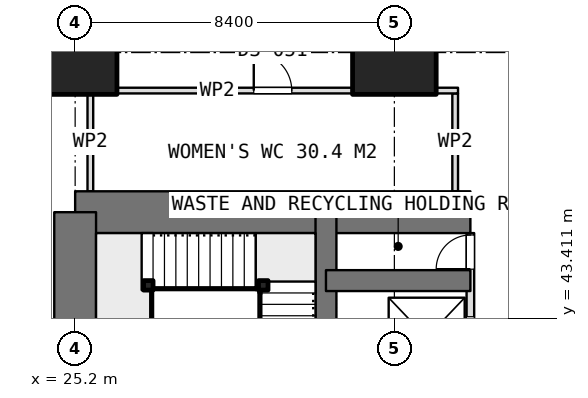
"""IFC4 building model, lengths in metres.
Left out: names, types, materials, properties, quantities, classifications, styles, units other than length and angle.
Written with IfcOpenShell. Run it as: python <this file> out.ifc"""

import sys

from ifc_helpers import new_model, si_unit, direction, frame, frame_2d, origin, origin_2d, place, context, subcontext, project, spatial, rectangle, extrude, element, fill, save


model = new_model("IFC4")
c1 = context("Model", 3, precision=1e-05, world=origin(), true_north=direction((0.0, 1.0)))
c2 = subcontext(c1, "Body", "Model", "MODEL_VIEW")
j1 = project(units=[si_unit("LENGTHUNIT", "METRE"), si_unit("PLANEANGLEUNIT", "RADIAN")], contexts=[c1])
p1 = place(None, origin())
s1 = spatial("IfcSite", under=j1, at=p1, CompositionType="ELEMENT")
p2 = place(p1, origin())
s2 = spatial("IfcBuilding", under=s1, at=p2, CompositionType="ELEMENT")
p3 = place(p2, frame((0.0, 0.0, 44.15)))
s3 = spatial("IfcBuildingStorey", under=s2, at=p3, CompositionType="ELEMENT", Elevation=44.15)
p4 = place(p3, frame((25.2, 46.2, 0.0), z_axis=(0.0, 0.0, 1.0), x_axis=(1.0, 0.0, 0.0)))
e1 = element("IfcWall", 1, at=p4, inside=s3, PredefinedType="SHEAR", context=c2, shape_type="SweptSolid", body=[
    extrude(rectangle(XDim=10.4, YDim=1.1, at=frame_2d((5.2, 0.0))), origin(), (0.0, 0.0, 1.0), 3.75),
])
p5 = place(p3, frame((25.2, 21.0, 0.0), z_axis=(0.0, 0.0, 1.0), x_axis=(0.0, 1.0, 0.0)))
e2 = element("IfcWall", 2, at=p5, inside=s3, PredefinedType="SHEAR", context=c2, shape_type="SweptSolid", body=[
    extrude(rectangle(XDim=25.2, YDim=1.1, at=frame_2d((12.6, 0.0))), origin(), (0.0, 0.0, 1.0), 3.75),
])
p6 = place(p5, frame((7.8, 0.0, 0.0)))
e3 = element("IfcOpeningElement", 3, at=p6, cuts=e2, PredefinedType="OPENING", context=c2, shape_type="SweptSolid", body=[
    extrude(rectangle(XDim=1.2, YDim=2.1, at=frame_2d((0.6, 1.05))), frame((0.0, 0.56, 0.0), z_axis=(0.0, -1.0, 0.0), x_axis=(1.0, 0.0, 0.0)), (0.0, 0.0, 1.0), 1.12),
])
p7 = place(p5, frame((14.25, 0.0, 0.0)))
e4 = element("IfcOpeningElement", 4, at=p7, cuts=e2, PredefinedType="OPENING", context=c2, shape_type="SweptSolid", body=[
    extrude(rectangle(XDim=0.9, YDim=2.1, at=frame_2d((0.45, 1.05))), frame((0.0, 0.56, 0.0), z_axis=(0.0, -1.0, 0.0), x_axis=(1.0, 0.0, 0.0)), (0.0, 0.0, 1.0), 1.12),
])
p8 = place(p5, frame((16.85, 0.0, 0.0)))
e5 = element("IfcOpeningElement", 5, at=p8, cuts=e2, PredefinedType="OPENING", context=c2, shape_type="SweptSolid", body=[
    extrude(rectangle(XDim=0.9, YDim=2.1, at=frame_2d((0.45, 1.05))), frame((0.0, 0.56, 0.0), z_axis=(0.0, -1.0, 0.0), x_axis=(1.0, 0.0, 0.0)), (0.0, 0.0, 1.0), 1.12),
])
p9 = place(p5, frame((19.075, 0.0, 0.0)))
e6 = element("IfcOpeningElement", 6, at=p9, cuts=e2, PredefinedType="OPENING", context=c2, shape_type="SweptSolid", body=[
    extrude(rectangle(XDim=1.2, YDim=2.1, at=frame_2d((0.6, 1.05))), frame((0.0, 0.56, 0.0), z_axis=(0.0, -1.0, 0.0), x_axis=(1.0, 0.0, 0.0)), (0.0, 0.0, 1.0), 1.12),
])
p10 = place(p3, frame((31.8, 21.0, 0.0), z_axis=(0.0, 0.0, 1.0), x_axis=(0.0, 1.0, 0.0)))
e7 = element("IfcWall", 7, at=p10, inside=s3, PredefinedType="SHEAR", context=c2, shape_type="SweptSolid", body=[
    extrude(rectangle(XDim=25.2, YDim=0.55, at=frame_2d((12.6, 0.0))), origin(), (0.0, 0.0, 1.0), 3.75),
])
p11 = place(p3, frame((31.8, 44.4, 0.0), z_axis=(0.0, 0.0, 1.0), x_axis=(1.0, 0.0, 0.0)))
e8 = element("IfcWall", 8, at=p11, inside=s3, PredefinedType="SHEAR", context=c2, shape_type="SweptSolid", body=[
    extrude(rectangle(XDim=3.8, YDim=0.55, at=frame_2d((1.9, 0.0))), origin(), (0.0, 0.0, 1.0), 3.75),
])
for number, where, z_axis, x_axis in (
    (9, (25.2, 50.4, 0.0), (0.0, 0.0, 1.0), (1.0, 0.0, 0.0)),
    (10, (33.6, 50.4, 0.0), (0.0, 0.0, 1.0), (1.0, 0.0, 0.0)),
):
    element("IfcColumn", number, at=place(p3, frame(where, z_axis=z_axis, x_axis=x_axis)), inside=s3, PredefinedType="COLUMN", context=c2, shape_type="SweptSolid", body=[
        extrude(rectangle(XDim=2.2, YDim=2.2, at=origin_2d()), origin(), (0.0, 0.0, 1.0), 3.75),
    ])
p12 = place(p3, frame((35.6, 41.675, 0.0), z_axis=(0.0, 0.0, 1.0), x_axis=(0.0, 1.0, 0.0)))
e11 = element("IfcWall", 11, at=p12, inside=s3, PredefinedType="PARTITIONING", context=c2, shape_type="SweptSolid", body=[
    extrude(rectangle(XDim=3.975, YDim=0.2, at=frame_2d((1.987, 0.0))), origin(), (0.0, 0.0, 1.0), 3.5),
])
p13 = place(p12, frame((3.025, 0.0, 0.0)))
e12 = element("IfcOpeningElement", 12, at=p13, cuts=e11, PredefinedType="OPENING", context=c2, shape_type="SweptSolid", body=[
    extrude(rectangle(XDim=0.9, YDim=2.1, at=frame_2d((0.45, 1.05))), frame((0.0, 0.11, 0.0), z_axis=(0.0, -1.0, 0.0), x_axis=(1.0, 0.0, 0.0)), (0.0, 0.0, 1.0), 0.22),
])
p14 = place(p12, frame((0.675, 0.0, 0.0)))
e13 = element("IfcOpeningElement", 13, at=p14, cuts=e11, PredefinedType="OPENING", context=c2, shape_type="SweptSolid", body=[
    extrude(rectangle(XDim=1.1, YDim=2.1, at=frame_2d((0.55, 1.05))), frame((0.0, 0.11, 0.0), z_axis=(0.0, -1.0, 0.0), x_axis=(1.0, 0.0, 0.0)), (0.0, 0.0, 1.0), 0.22),
])
p15 = place(p3, frame((25.525, 49.4, 0.0), z_axis=(0.0, 0.0, 1.0), x_axis=(1.0, 0.0, 0.0)))
e14 = element("IfcWall", 14, at=p15, inside=s3, PredefinedType="PARTITIONING", context=c2, shape_type="SweptSolid", body=[
    extrude(rectangle(XDim=9.75, YDim=0.15, at=frame_2d((4.875, 0.0))), origin(), (0.0, 0.0, 1.0), 3.5),
])
p16 = place(p15, frame((4.375, 0.0, 0.0)))
e15 = element("IfcOpeningElement", 15, at=p16, cuts=e14, PredefinedType="OPENING", context=c2, shape_type="SweptSolid", body=[
    extrude(rectangle(XDim=1.0, YDim=2.1, at=frame_2d((0.5, 1.05))), frame((0.0, 0.085, 0.0), z_axis=(0.0, -1.0, 0.0), x_axis=(1.0, 0.0, 0.0)), (0.0, 0.0, 1.0), 0.17),
])
for number, where, z_axis, x_axis in (
    (16, (25.6, 46.75, 0.0), (0.0, 0.0, 1.0), (0.0, 1.0, 0.0)),
    (17, (35.2, 46.75, 0.0), (0.0, 0.0, 1.0), (0.0, 1.0, 0.0)),
):
    element("IfcWall", number, at=place(p3, frame(where, z_axis=z_axis, x_axis=x_axis)), inside=s3, PredefinedType="PARTITIONING", context=c2, shape_type="SweptSolid", body=[
        extrude(rectangle(XDim=2.575, YDim=0.15, at=frame_2d((1.288, 0.0))), origin(), (0.0, 0.0, 1.0), 3.5),
    ])
for number, where, z_axis, x_axis in (
    (18, (30.15, 44.275, 0.0), (0.0, 0.0, 1.0), (1.0, 0.0, 0.0)),
    (19, (27.125, 44.275, 0.0), (0.0, 0.0, 1.0), (1.0, 0.0, 0.0)),
):
    element("IfcColumn", number, at=place(p3, frame(where, z_axis=z_axis, x_axis=x_axis)), inside=s3, PredefinedType="COLUMN", context=c2, shape_type="SweptSolid", body=[
        extrude(rectangle(XDim=0.25, YDim=0.25, at=origin_2d()), origin(), (0.0, 0.0, 1.0), 3.75),
    ])
p17 = place(p13, origin())
e20 = element("IfcDoor", 20, at=p17, inside=s3, OperationType="SINGLE_SWING_LEFT", PredefinedType="DOOR", context=c2, shape_type="SweptSolid", body=[
    extrude(rectangle(XDim=0.9, YDim=2.1, at=frame_2d((0.45, 1.05))), frame((0.0, 0.025, 0.0), z_axis=(0.0, -1.0, 0.0), x_axis=(1.0, 0.0, 0.0)), (0.0, 0.0, 1.0), 0.05),
])
fill(e12, e20)
p18 = place(p14, origin())
e21 = element("IfcDoor", 21, at=p18, inside=s3, OperationType="SLIDING_TO_LEFT", PredefinedType="USERDEFINED", context=c2, shape_type="SweptSolid", body=[
    extrude(rectangle(XDim=1.1, YDim=2.1, at=frame_2d((0.55, 1.05))), frame((0.0, 0.025, 0.0), z_axis=(0.0, -1.0, 0.0), x_axis=(1.0, 0.0, 0.0)), (0.0, 0.0, 1.0), 0.05),
])
fill(e13, e21)
p19 = place(p16, origin())
e22 = element("IfcDoor", 22, at=p19, inside=s3, OperationType="SINGLE_SWING_LEFT", PredefinedType="DOOR", context=c2, shape_type="SweptSolid", body=[
    extrude(rectangle(XDim=1.0, YDim=2.1, at=frame_2d((0.5, 1.05))), frame((0.0, 0.025, 0.0), z_axis=(0.0, -1.0, 0.0), x_axis=(1.0, 0.0, 0.0)), (0.0, 0.0, 1.0), 0.05),
])
fill(e15, e22)
save(model, sys.argv[1])
